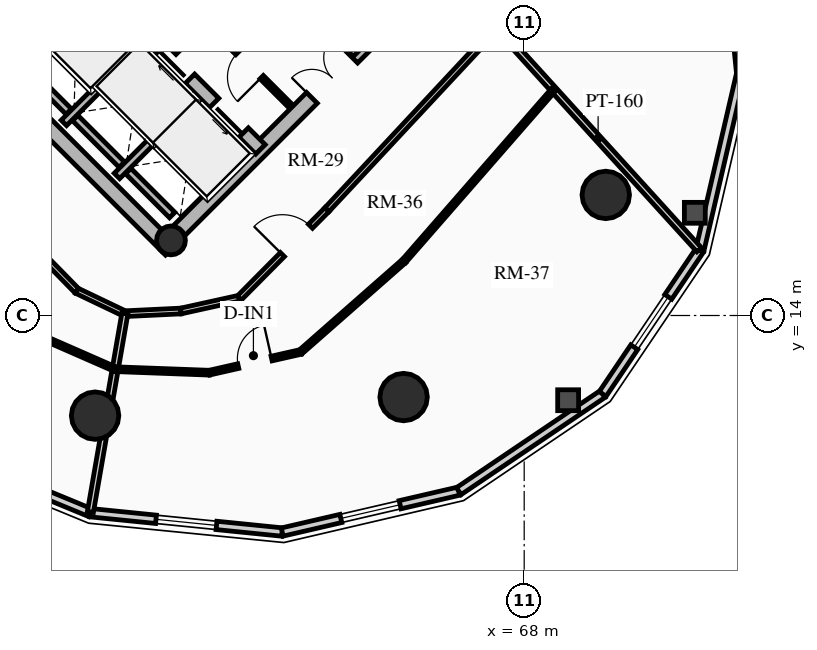
"""IFC4 building model, lengths in metres.
Left out: names, types, materials, properties, quantities, classifications, styles, units other than length and angle.
Written with IfcOpenShell. Run it as: python <this file> out.ifc"""

import sys

from ifc_helpers import new_model, si_unit, direction, frame, frame_2d, origin, origin_2d, place, context, subcontext, project, spatial, rectangle, circle, hollow_circle, extrude, source, transform, mapped, element, fill, save


model = new_model("IFC4")
c1 = context("Model", 3, precision=1e-05, world=origin(), true_north=direction((0.0, 1.0)))
c2 = subcontext(c1, "Body", "Model", "MODEL_VIEW")
j1 = project(units=[si_unit("LENGTHUNIT", "METRE"), si_unit("PLANEANGLEUNIT", "RADIAN")], contexts=[c1])
p1 = place(None, origin())
s1 = spatial("IfcSite", under=j1, at=p1, CompositionType="ELEMENT")
p2 = place(p1, origin())
s2 = spatial("IfcBuilding", under=s1, at=p2, CompositionType="ELEMENT")
p3 = place(p2, frame((0.0, 0.0, 166.15)))
s3 = spatial("IfcBuildingStorey", under=s2, at=p3, CompositionType="ELEMENT", Elevation=166.15)
p4 = place(p3, frame((58.702, 15.732, 0.0), z_axis=(0.0, 0.0, 1.0), x_axis=(-0.707106781187, 0.707106781187, 0.0)))
e1 = element("IfcWall", 1, at=p4, inside=s3, PredefinedType="SHEAR", context=c2, shape_type="SweptSolid", body=[
    extrude(rectangle(XDim=14.1, YDim=0.4, at=frame_2d((7.05, 0.0))), origin(), (0.0, 0.0, 1.0), 2.91),
])
p5 = place(p3, frame((58.561, 15.873, 0.0), z_axis=(0.0, 0.0, 1.0), x_axis=(0.707106781187, 0.707106781187, 0.0)))
e2 = element("IfcWall", 2, at=p5, inside=s3, PredefinedType="SHEAR", context=c2, shape_type="SweptSolid", body=[
    extrude(rectangle(XDim=10.7, YDim=0.4, at=frame_2d((5.35, 0.0))), origin(), (0.0, 0.0, 1.0), 2.91),
])
m1 = source(origin(), c2, "Body", "SweptSolid", [
    extrude(rectangle(XDim=1.5, YDim=2.02, at=frame_2d((0.75, 1.01))), frame((0.0, 0.21, 0.0), z_axis=(0.0, -1.0, 0.0), x_axis=(1.0, 0.0, 0.0)), (0.0, 0.0, 1.0), 0.42),
])
p6 = place(p5, frame((5.45, 0.0, 0.0)))
e3 = element("IfcOpeningElement", 3, at=p6, cuts=e2, PredefinedType="OPENING", context=c2, shape_type="MappedRepresentation", body=[
    mapped(m1, transform((0.0, 0.0, 0.0), x_axis=(1.0, 0.0, 0.0), y_axis=(0.0, 1.0, 0.0), z_axis=(0.0, 0.0, 1.0), scale=1.0)),
])
p7 = place(p3, frame((61.06, 18.373, 0.0), z_axis=(0.0, 0.0, 1.0), x_axis=(-0.707106781187, 0.707106781187, 0.0)))
e4 = element("IfcWall", 4, at=p7, inside=s3, PredefinedType="SHEAR", context=c2, shape_type="SweptSolid", body=[
    extrude(rectangle(XDim=13.7, YDim=0.35, at=frame_2d((6.85, 0.0))), origin(), (0.0, 0.0, 1.0), 2.91),
])
m2 = source(origin(), c2, "Body", "SweptSolid", [
    extrude(rectangle(XDim=1.1, YDim=2.015, at=frame_2d((0.55, 1.007))), frame((0.0, 0.185, 0.0), z_axis=(0.0, -1.0, 0.0), x_axis=(1.0, 0.0, 0.0)), (0.0, 0.0, 1.0), 0.37),
])
p8 = place(p7, frame((4.85, 0.0, 0.0)))
e5 = element("IfcOpeningElement", 5, at=p8, cuts=e4, PredefinedType="OPENING", context=c2, shape_type="MappedRepresentation", body=[
    mapped(m2, transform((0.0, 0.0, 0.0), x_axis=(1.0, 0.0, 0.0), y_axis=(0.0, 1.0, 0.0), z_axis=(0.0, 0.0, 1.0), scale=1.0)),
])
p9 = place(p7, frame((0.625, 0.0, 0.0)))
e6 = element("IfcOpeningElement", 6, at=p9, cuts=e4, PredefinedType="OPENING", context=c2, shape_type="MappedRepresentation", body=[
    mapped(m2, transform((0.0, 0.0, 0.0), x_axis=(1.0, 0.0, 0.0), y_axis=(0.0, 1.0, 0.0), z_axis=(0.0, 0.0, 1.0), scale=1.0)),
])
p10 = place(p7, frame((2.625, 0.0, 0.0)))
e7 = element("IfcOpeningElement", 7, at=p10, cuts=e4, PredefinedType="OPENING", context=c2, shape_type="MappedRepresentation", body=[
    mapped(m2, transform((0.0, 0.0, 0.0), x_axis=(1.0, 0.0, 0.0), y_axis=(0.0, 1.0, 0.0), z_axis=(0.0, 0.0, 1.0), scale=1.0)),
])
m3 = source(origin(), c2, "Body", "SweptSolid", [
    extrude(rectangle(XDim=1.15, YDim=2.02, at=frame_2d((0.575, 1.01))), frame((0.0, 0.185, 0.0), z_axis=(0.0, -1.0, 0.0), x_axis=(1.0, 0.0, 0.0)), (0.0, 0.0, 1.0), 0.37),
])
p11 = place(p7, frame((7.27, 0.0, 0.0)))
e8 = element("IfcOpeningElement", 8, at=p11, cuts=e4, PredefinedType="OPENING", context=c2, shape_type="MappedRepresentation", body=[
    mapped(m3, transform((0.0, 0.0, 0.0), x_axis=(1.0, 0.0, 0.0), y_axis=(0.0, 1.0, 0.0), z_axis=(0.0, 0.0, 1.0), scale=1.0)),
])
p12 = place(p3, frame((63.627, 20.94, 0.0), z_axis=(0.0, 0.0, 1.0), x_axis=(-0.707119496762, 0.707094065383, 0.0)))
e9 = element("IfcWall", 9, at=p12, inside=s3, PredefinedType="SHEAR", context=c2, shape_type="SweptSolid", body=[
    extrude(rectangle(XDim=9.6, YDim=0.35, at=frame_2d((4.8, 0.0))), origin(), (0.0, 0.0, 1.0), 2.91),
])
p13 = place(p12, frame((5.28, 0.0, 0.0)))
e10 = element("IfcOpeningElement", 10, at=p13, cuts=e9, PredefinedType="OPENING", context=c2, shape_type="MappedRepresentation", body=[
    mapped(m3, transform((0.0, 0.0, 0.0), x_axis=(1.0, 0.0, 0.0), y_axis=(0.0, 1.0, 0.0), z_axis=(0.0, 0.0, 1.0), scale=1.0)),
])
p14 = place(p3, frame((53.784, 21.003, 0.0), z_axis=(0.0, 0.0, 1.0), x_axis=(0.707106781187, 0.707106781187, 0.0)))
e11 = element("IfcWall", 11, at=p14, inside=s3, PredefinedType="SHEAR", context=c2, shape_type="SweptSolid", body=[
    extrude(rectangle(XDim=3.285, YDim=0.35, at=frame_2d((1.643, 0.0))), origin(), (0.0, 0.0, 1.0), 2.91),
])
p15 = place(p3, frame((58.706, 15.976, 0.0), z_axis=(0.0, 0.0, 1.0), x_axis=(0.707106781187, 0.707106781187, 0.0)))
e12 = element("IfcColumn", 12, at=p15, inside=s3, PredefinedType="COLUMN", context=c2, shape_type="SweptSolid", body=[
    extrude(hollow_circle(Radius=0.38, WallThickness=0.032, at=origin_2d()), origin(), (0.0, 0.0, 1.0), 2.91),
])
for number, where, z_axis, x_axis in (
    (13, (56.709, 11.365, 0.0), (0.0, 0.0, 1.0), (1.0, 0.0, 0.0)),
    (14, (64.827, 11.854, 0.0), (0.0, 0.0, 1.0), (1.0, 0.0, 0.0)),
    (15, (70.146, 17.173, 0.0), (0.0, 0.0, 1.0), (1.0, 0.0, 0.0)),
):
    element("IfcColumn", number, at=place(p3, frame(where, z_axis=z_axis, x_axis=x_axis)), inside=s3, PredefinedType="USERDEFINED", context=c2, shape_type="SweptSolid", body=[
        extrude(circle(Radius=0.625, at=origin_2d()), origin(), (0.0, 0.0, 1.0), 2.91),
    ])
p16 = place(p3, frame((56.582, 8.811, 0.0), z_axis=(0.0, 0.0, 1.0), x_axis=(-0.924528197738, 0.38111364655, 0.0)))
e16 = element("IfcWall", 16, at=p16, inside=s3, PredefinedType="SOLIDWALL", context=c2, shape_type="SweptSolid", body=[
    extrude(rectangle(XDim=5.366, YDim=0.22, at=frame_2d((2.683, 0.0))), origin(), (0.0, 0.0, 1.0), 2.675),
])
p17 = place(p3, frame((61.633, 8.302, 0.0), z_axis=(0.0, 0.0, 1.0), x_axis=(-0.994959267396, 0.100279889424, 0.0)))
e17 = element("IfcWall", 17, at=p17, inside=s3, PredefinedType="SOLIDWALL", context=c2, shape_type="SweptSolid", body=[
    extrude(rectangle(XDim=5.076, YDim=0.22, at=frame_2d((2.538, 0.0))), origin(), (0.0, 0.0, 1.0), 2.675),
])
m4 = source(origin(), c2, "Body", "SweptSolid", [
    extrude(rectangle(XDim=1.6, YDim=1.3, at=frame_2d((0.8, 0.65))), frame((0.0, 0.12, 0.0), z_axis=(0.0, -1.0, 0.0), x_axis=(1.0, 0.0, 0.0)), (0.0, 0.0, 1.0), 0.24),
])
p18 = place(p17, frame((1.738, 0.0, 0.65)))
e18 = element("IfcOpeningElement", 18, at=p18, cuts=e17, PredefinedType="OPENING", context=c2, shape_type="MappedRepresentation", body=[
    mapped(m4, transform((0.0, 0.0, 0.0), x_axis=(1.0, 0.0, 0.0), y_axis=(0.0, 1.0, 0.0), z_axis=(0.0, 0.0, 1.0), scale=1.0)),
])
p19 = place(p3, frame((66.279, 9.378, 0.0), z_axis=(0.0, 0.0, 1.0), x_axis=(-0.974206226622, -0.225659540039, 0.0)))
e19 = element("IfcWall", 19, at=p19, inside=s3, PredefinedType="SOLIDWALL", context=c2, shape_type="SweptSolid", body=[
    extrude(rectangle(XDim=4.769, YDim=0.22, at=frame_2d((2.385, 0.0))), origin(), (0.0, 0.0, 1.0), 2.675),
])
p20 = place(p19, frame((1.585, 0.0, 0.65)))
e20 = element("IfcOpeningElement", 20, at=p20, cuts=e19, PredefinedType="OPENING", context=c2, shape_type="MappedRepresentation", body=[
    mapped(m4, transform((0.0, 0.0, 0.0), x_axis=(1.0, 0.0, 0.0), y_axis=(0.0, 1.0, 0.0), z_axis=(0.0, 0.0, 1.0), scale=1.0)),
])
p21 = place(p3, frame((70.065, 11.935, 0.0), z_axis=(0.0, 0.0, 1.0), x_axis=(-0.828739009952, -0.559635286042, 0.0)))
e21 = element("IfcWall", 21, at=p21, inside=s3, PredefinedType="SOLIDWALL", context=c2, shape_type="SweptSolid", body=[
    extrude(rectangle(XDim=4.569, YDim=0.22, at=frame_2d((2.284, 0.0))), origin(), (0.0, 0.0, 1.0), 2.675),
])
p22 = place(p3, frame((72.622, 15.721, 0.0), z_axis=(0.0, 0.0, 1.0), x_axis=(-0.559635286042, -0.828739009952, 0.0)))
e22 = element("IfcWall", 22, at=p22, inside=s3, PredefinedType="SOLIDWALL", context=c2, shape_type="SweptSolid", body=[
    extrude(rectangle(XDim=4.569, YDim=0.22, at=frame_2d((2.284, 0.0))), origin(), (0.0, 0.0, 1.0), 2.675),
])
p23 = place(p22, frame((1.484, 0.0, 0.65)))
e23 = element("IfcOpeningElement", 23, at=p23, cuts=e22, PredefinedType="OPENING", context=c2, shape_type="MappedRepresentation", body=[
    mapped(m4, transform((0.0, 0.0, 0.0), x_axis=(1.0, 0.0, 0.0), y_axis=(0.0, 1.0, 0.0), z_axis=(0.0, 0.0, 1.0), scale=1.0)),
])
p24 = place(p3, frame((73.698, 20.367, 0.0), z_axis=(0.0, 0.0, 1.0), x_axis=(-0.225659540039, -0.974206226622, 0.0)))
e24 = element("IfcWall", 24, at=p24, inside=s3, PredefinedType="SOLIDWALL", context=c2, shape_type="SweptSolid", body=[
    extrude(rectangle(XDim=4.769, YDim=0.22, at=frame_2d((2.385, 0.0))), origin(), (0.0, 0.0, 1.0), 2.675),
])
p25 = place(p3, frame((73.189, 25.418, 0.0), z_axis=(0.0, 0.0, 1.0), x_axis=(0.100279889424, -0.994959267396, 0.0)))
e25 = element("IfcWall", 25, at=p25, inside=s3, PredefinedType="SOLIDWALL", context=c2, shape_type="SweptSolid", body=[
    extrude(rectangle(XDim=5.076, YDim=0.22, at=frame_2d((2.538, 0.0))), origin(), (0.0, 0.0, 1.0), 2.675),
])
p26 = place(p25, frame((1.738, 0.0, 0.65)))
e26 = element("IfcOpeningElement", 26, at=p26, cuts=e25, PredefinedType="OPENING", context=c2, shape_type="MappedRepresentation", body=[
    mapped(m4, transform((0.0, 0.0, 0.0), x_axis=(1.0, 0.0, 0.0), y_axis=(0.0, 1.0, 0.0), z_axis=(0.0, 0.0, 1.0), scale=1.0)),
])
p27 = place(p3, frame((55.888, 19.069, 0.0), z_axis=(0.0, 0.0, 1.0), x_axis=(0.707106781187, 0.707106781187, 0.0)))
e27 = element("IfcWall", 27, at=p27, inside=s3, PredefinedType="SHEAR", context=c2, shape_type="SweptSolid", body=[
    extrude(rectangle(XDim=2.97, YDim=0.2, at=frame_2d((1.485, 0.0))), origin(), (0.0, 0.0, 1.0), 2.91),
])
p28 = place(p3, frame((56.015, 19.366, 0.0), z_axis=(0.0, 0.0, 1.0), x_axis=(-0.707106781187, 0.707106781187, 0.0)))
e28 = element("IfcWall", 28, at=p28, inside=s3, PredefinedType="SHEAR", context=c2, shape_type="SweptSolid", body=[
    extrude(rectangle(XDim=2.44, YDim=0.2, at=frame_2d((1.22, 0.0))), origin(), (0.0, 0.0, 1.0), 2.91),
])
p29 = place(p3, frame((57.284, 17.673, 0.0), z_axis=(0.0, 0.0, 1.0), x_axis=(0.707147878904, 0.70706568108, 0.0)))
e29 = element("IfcWall", 29, at=p29, inside=s3, PredefinedType="SHEAR", context=c2, shape_type="SweptSolid", body=[
    extrude(rectangle(XDim=2.97, YDim=0.2, at=frame_2d((1.485, 0.0))), origin(), (0.0, 0.0, 1.0), 2.91),
])
p30 = place(p3, frame((57.412, 17.97, 0.0), z_axis=(0.0, 0.0, 1.0), x_axis=(-0.707106781187, 0.707106781187, 0.0)))
e30 = element("IfcWall", 30, at=p30, inside=s3, PredefinedType="SHEAR", context=c2, shape_type="SweptSolid", body=[
    extrude(rectangle(XDim=1.735, YDim=0.2, at=frame_2d((0.867, 0.0))), origin(), (0.0, 0.0, 1.0), 2.91),
])
p31 = place(p3, frame((58.737, 16.644, 0.0), z_axis=(0.0, 0.0, 1.0), x_axis=(-0.707032117043, 0.707181437447, 0.0)))
e31 = element("IfcWall", 31, at=p31, inside=s3, PredefinedType="SHEAR", context=c2, shape_type="SweptSolid", body=[
    extrude(rectangle(XDim=1.635, YDim=0.2, at=frame_2d((0.817, 0.0))), origin(), (0.0, 0.0, 1.0), 2.91),
])
p32 = place(p3, frame((61.835, 19.529, 0.0), z_axis=(0.0, 0.0, 1.0), x_axis=(-0.707146413884, 0.707067146267, 0.0)))
e32 = element("IfcWall", 32, at=p32, inside=s3, PredefinedType="PARTITIONING", context=c2, shape_type="SweptSolid", body=[
    extrude(rectangle(XDim=3.08, YDim=0.125, at=frame_2d((1.54, 0.0))), origin(), (0.0, 0.0, 1.0), 2.675),
])
m5 = source(origin(), c2, "Body", "SweptSolid", [
    extrude(rectangle(XDim=0.9, YDim=2.005, at=frame_2d((0.45, 1.002))), frame((0.0, 0.073, 0.0), z_axis=(0.0, -1.0, 0.0), x_axis=(1.0, 0.0, 0.0)), (0.0, 0.0, 1.0), 0.145),
])
p33 = place(p32, frame((1.05, 0.0, 0.0)))
e33 = element("IfcOpeningElement", 33, at=p33, cuts=e32, PredefinedType="OPENING", context=c2, shape_type="MappedRepresentation", body=[
    mapped(m5, transform((0.0, 0.0, 0.0), x_axis=(1.0, 0.0, 0.0), y_axis=(0.0, 1.0, 0.0), z_axis=(0.0, 0.0, 1.0), scale=1.0)),
])
p34 = place(p3, frame((58.794, 20.915, 0.0), z_axis=(0.0, 0.0, 1.0), x_axis=(0.707106781187, 0.707106781187, 0.0)))
e34 = element("IfcWall", 34, at=p34, inside=s3, PredefinedType="PARTITIONING", context=c2, shape_type="SweptSolid", body=[
    extrude(rectangle(XDim=1.1, YDim=0.125, at=frame_2d((0.55, 0.0))), origin(), (0.0, 0.0, 1.0), 2.675),
])
p35 = place(p3, frame((51.985, 18.985, 0.0), z_axis=(0.0, 0.0, 1.0), x_axis=(0.699619654291, -0.714515457726, 0.0)))
e35 = element("IfcWall", 35, at=p35, inside=s3, PredefinedType="PARTITIONING", context=c2, shape_type="SweptSolid", body=[
    extrude(rectangle(XDim=6.064, YDim=0.15, at=frame_2d((3.032, 0.0))), origin(), (0.0, 0.0, 1.0), 2.245),
])
m6 = source(origin(), c2, "Body", "SweptSolid", [
    extrude(rectangle(XDim=1.05, YDim=2.015, at=frame_2d((0.525, 1.007))), frame((0.0, 0.085, 0.0), z_axis=(0.0, -1.0, 0.0), x_axis=(1.0, 0.0, 0.0)), (0.0, 0.0, 1.0), 0.17),
])
p36 = place(p35, frame((2.507, 0.0, 0.0)))
e36 = element("IfcOpeningElement", 36, at=p36, cuts=e35, PredefinedType="OPENING", context=c2, shape_type="MappedRepresentation", body=[
    mapped(m6, transform((0.0, 0.0, 0.0), x_axis=(1.0, 0.0, 0.0), y_axis=(0.0, 1.0, 0.0), z_axis=(0.0, 0.0, 1.0), scale=1.0)),
])
p37 = place(p3, frame((56.227, 14.652, 0.0), z_axis=(0.0, 0.0, 1.0), x_axis=(0.902364039563, -0.430974639745, 0.0)))
e37 = element("IfcWall", 37, at=p37, inside=s3, PredefinedType="PARTITIONING", context=c2, shape_type="SweptSolid", body=[
    extrude(rectangle(XDim=1.401, YDim=0.15, at=frame_2d((0.701, 0.0))), origin(), (0.0, 0.0, 1.0), 2.245),
])
p38 = place(p3, frame((57.492, 14.048, 0.0), z_axis=(0.0, 0.0, 1.0), x_axis=(0.99885011351, 0.047942160364, 0.0)))
e38 = element("IfcWall", 38, at=p38, inside=s3, PredefinedType="PARTITIONING", context=c2, shape_type="SweptSolid", body=[
    extrude(rectangle(XDim=1.477, YDim=0.15, at=frame_2d((0.738, 0.0))), origin(), (0.0, 0.0, 1.0), 2.245),
])
p39 = place(p3, frame((58.967, 14.118, 0.0), z_axis=(0.0, 0.0, 1.0), x_axis=(0.976471358036, 0.215647135235, 0.0)))
e39 = element("IfcWall", 39, at=p39, inside=s3, PredefinedType="PARTITIONING", context=c2, shape_type="SweptSolid", body=[
    extrude(rectangle(XDim=1.571, YDim=0.15, at=frame_2d((0.786, 0.0))), origin(), (0.0, 0.0, 1.0), 2.245),
])
p40 = place(p3, frame((60.501, 14.457, 0.0), z_axis=(0.0, 0.0, 1.0), x_axis=(0.704012266258, 0.710187812454, 0.0)))
e40 = element("IfcWall", 40, at=p40, inside=s3, PredefinedType="PARTITIONING", context=c2, shape_type="SweptSolid", body=[
    extrude(rectangle(XDim=3.281, YDim=0.15, at=frame_2d((1.641, 0.0))), origin(), (0.0, 0.0, 1.0), 2.245),
])
p41 = place(p40, frame((1.614, 0.0, 0.0)))
e41 = element("IfcOpeningElement", 41, at=p41, cuts=e40, PredefinedType="OPENING", context=c2, shape_type="MappedRepresentation", body=[
    mapped(m6, transform((0.0, 0.0, 0.0), x_axis=(1.0, 0.0, 0.0), y_axis=(0.0, 1.0, 0.0), z_axis=(0.0, 0.0, 1.0), scale=1.0)),
])
p42 = place(p3, frame((62.812, 16.788, 0.0), z_axis=(0.0, 0.0, 1.0), x_axis=(0.682323555485, 0.731050316757, 0.0)))
e42 = element("IfcWall", 42, at=p42, inside=s3, PredefinedType="PARTITIONING", context=c2, shape_type="SweptSolid", body=[
    extrude(rectangle(XDim=6.559, YDim=0.15, at=frame_2d((3.279, 0.0))), origin(), (0.0, 0.0, 1.0), 2.245),
])
p43 = place(p3, frame((57.492, 14.048, 0.0), z_axis=(0.0, 0.0, 1.0), x_axis=(-0.171191349619, -0.985237799628, 0.0)))
e43 = element("IfcWall", 43, at=p43, inside=s3, PredefinedType="PARTITIONING", context=c2, shape_type="SweptSolid", body=[
    extrude(rectangle(XDim=5.295, YDim=0.16, at=frame_2d((2.647, 0.0))), origin(), (0.0, 0.0, 1.0), 2.245),
])
p44 = place(p3, frame((67.287, 21.582, 0.0), z_axis=(0.0, 0.0, 1.0), x_axis=(0.672520632772, -0.740078373212, 0.0)))
e44 = element("IfcWall", 44, at=p44, inside=s3, PredefinedType="PARTITIONING", context=c2, shape_type="SweptSolid", body=[
    extrude(rectangle(XDim=7.907, YDim=0.16, at=frame_2d((3.954, 0.0))), origin(), (0.0, 0.0, 1.0), 2.245),
])
p45 = place(p3, frame((54.94, 13.594, 0.0), z_axis=(0.0, 0.0, 1.0), x_axis=(0.915898070967, -0.401410916143, 0.0)))
e45 = element("IfcWall", 45, at=p45, inside=s3, PredefinedType="PARTITIONING", context=c2, shape_type="SweptSolid", body=[
    extrude(rectangle(XDim=2.509, YDim=0.125, at=frame_2d((1.254, 0.0))), origin(), (0.0, 0.0, 1.0), 2.245),
])
p46 = place(p3, frame((57.238, 12.587, 0.0), z_axis=(0.0, 0.0, 1.0), x_axis=(0.999316318576, -0.036971548882, 0.0)))
e46 = element("IfcWall", 46, at=p46, inside=s3, PredefinedType="PARTITIONING", context=c2, shape_type="SweptSolid", body=[
    extrude(rectangle(XDim=2.476, YDim=0.125, at=frame_2d((1.238, 0.0))), origin(), (0.0, 0.0, 1.0), 2.245),
])
p47 = place(p3, frame((59.713, 12.495, 0.0), z_axis=(0.0, 0.0, 1.0), x_axis=(0.975260144608, 0.221060286662, 0.0)))
e47 = element("IfcWall", 47, at=p47, inside=s3, PredefinedType="PARTITIONING", context=c2, shape_type="SweptSolid", body=[
    extrude(rectangle(XDim=2.465, YDim=0.125, at=frame_2d((1.232, 0.0))), origin(), (0.0, 0.0, 1.0), 2.245),
])
p48 = place(p47, frame((0.782, 0.0, 0.0)))
e48 = element("IfcOpeningElement", 48, at=p48, cuts=e47, PredefinedType="OPENING", context=c2, shape_type="MappedRepresentation", body=[
    mapped(m5, transform((0.0, 0.0, 0.0), x_axis=(1.0, 0.0, 0.0), y_axis=(0.0, 1.0, 0.0), z_axis=(0.0, 0.0, 1.0), scale=1.0)),
])
p49 = place(p3, frame((62.117, 13.04, 0.0), z_axis=(0.0, 0.0, 1.0), x_axis=(0.751084924077, 0.660205601933, 0.0)))
e49 = element("IfcWall", 49, at=p49, inside=s3, PredefinedType="PARTITIONING", context=c2, shape_type="SweptSolid", body=[
    extrude(rectangle(XDim=3.624, YDim=0.125, at=frame_2d((1.812, 0.0))), origin(), (0.0, 0.0, 1.0), 2.245),
])
p50 = place(p3, frame((64.839, 15.433, 0.0), z_axis=(0.0, 0.0, 1.0), x_axis=(0.657505208165, 0.753449999161, 0.0)))
e50 = element("IfcWall", 50, at=p50, inside=s3, PredefinedType="PARTITIONING", context=c2, shape_type="SweptSolid", body=[
    extrude(rectangle(XDim=5.988, YDim=0.125, at=frame_2d((2.994, 0.0))), origin(), (0.0, 0.0, 1.0), 2.245),
])
m7 = source(origin(), c2, "Body", "SweptSolid", [
    extrude(rectangle(XDim=1.6, YDim=1.3, at=frame_2d((0.8, 0.65))), frame((0.0, 0.03, 0.0), z_axis=(0.0, -1.0, 0.0), x_axis=(1.0, 0.0, 0.0)), (0.0, 0.0, 1.0), 0.06),
])
p51 = place(p18, origin())
e51 = element("IfcWindow", 51, at=p51, inside=s3, PartitioningType="SINGLE_PANEL", PredefinedType="WINDOW", context=c2, shape_type="MappedRepresentation", body=[
    mapped(m7, transform((0.0, 0.0, 0.0), x_axis=(1.0, 0.0, 0.0), y_axis=(0.0, 1.0, 0.0), z_axis=(0.0, 0.0, 1.0), scale=1.0)),
])
fill(e18, e51)
p52 = place(p20, origin())
e52 = element("IfcWindow", 52, at=p52, inside=s3, PartitioningType="SINGLE_PANEL", PredefinedType="WINDOW", context=c2, shape_type="MappedRepresentation", body=[
    mapped(m7, transform((0.0, 0.0, 0.0), x_axis=(1.0, 0.0, 0.0), y_axis=(0.0, 1.0, 0.0), z_axis=(0.0, 0.0, 1.0), scale=1.0)),
])
fill(e20, e52)
p53 = place(p23, origin())
e53 = element("IfcWindow", 53, at=p53, inside=s3, PartitioningType="SINGLE_PANEL", PredefinedType="WINDOW", context=c2, shape_type="MappedRepresentation", body=[
    mapped(m7, transform((0.0, 0.0, 0.0), x_axis=(1.0, 0.0, 0.0), y_axis=(0.0, 1.0, 0.0), z_axis=(0.0, 0.0, 1.0), scale=1.0)),
])
fill(e23, e53)
m8 = source(origin(), c2, "Body", "SweptSolid", [
    extrude(rectangle(XDim=1.1, YDim=2.015, at=frame_2d((0.55, 1.007))), frame((0.0, 0.025, 0.0), z_axis=(0.0, -1.0, 0.0), x_axis=(1.0, 0.0, 0.0)), (0.0, 0.0, 1.0), 0.05),
])
p54 = place(p9, origin())
e54 = element("IfcDoor", 54, at=p54, inside=s3, OperationType="SLIDING_TO_LEFT", PredefinedType="DOOR", context=c2, shape_type="MappedRepresentation", body=[
    mapped(m8, transform((0.0, 0.0, 0.0), x_axis=(1.0, 0.0, 0.0), y_axis=(0.0, 1.0, 0.0), z_axis=(0.0, 0.0, 1.0), scale=1.0)),
])
fill(e6, e54)
p55 = place(p10, origin())
e55 = element("IfcDoor", 55, at=p55, inside=s3, OperationType="SLIDING_TO_RIGHT", PredefinedType="DOOR", context=c2, shape_type="MappedRepresentation", body=[
    mapped(m8, transform((0.0, 0.0, 0.0), x_axis=(1.0, 0.0, 0.0), y_axis=(0.0, 1.0, 0.0), z_axis=(0.0, 0.0, 1.0), scale=1.0)),
])
fill(e7, e55)
m9 = source(origin(), c2, "Body", "SweptSolid", [
    extrude(rectangle(XDim=1.5, YDim=2.02, at=frame_2d((0.75, 1.01))), frame((0.0, 0.025, 0.0), z_axis=(0.0, -1.0, 0.0), x_axis=(1.0, 0.0, 0.0)), (0.0, 0.0, 1.0), 0.05),
])
p56 = place(p6, origin())
e56 = element("IfcDoor", 56, at=p56, inside=s3, OperationType="DOUBLE_DOOR_SINGLE_SWING", PredefinedType="DOOR", context=c2, shape_type="MappedRepresentation", body=[
    mapped(m9, transform((0.0, 0.0, 0.0), x_axis=(1.0, 0.0, 0.0), y_axis=(0.0, 1.0, 0.0), z_axis=(0.0, 0.0, 1.0), scale=1.0)),
])
fill(e3, e56)
m10 = source(origin(), c2, "Body", "SweptSolid", [
    extrude(rectangle(XDim=0.9, YDim=2.005, at=frame_2d((0.45, 1.002))), frame((0.0, 0.025, 0.0), z_axis=(0.0, -1.0, 0.0), x_axis=(1.0, 0.0, 0.0)), (0.0, 0.0, 1.0), 0.05),
])
p57 = place(p33, origin())
e57 = element("IfcDoor", 57, at=p57, inside=s3, OperationType="SINGLE_SWING_LEFT", PredefinedType="DOOR", context=c2, shape_type="MappedRepresentation", body=[
    mapped(m10, transform((0.0, 0.0, 0.0), x_axis=(1.0, 0.0, 0.0), y_axis=(0.0, 1.0, 0.0), z_axis=(0.0, 0.0, 1.0), scale=1.0)),
])
fill(e33, e57)
m11 = source(origin(), c2, "Body", "SweptSolid", [
    extrude(rectangle(XDim=1.05, YDim=2.015, at=frame_2d((0.525, 1.007))), frame((0.0, 0.025, 0.0), z_axis=(0.0, -1.0, 0.0), x_axis=(1.0, 0.0, 0.0)), (0.0, 0.0, 1.0), 0.05),
])
p58 = place(p41, origin())
e58 = element("IfcDoor", 58, at=p58, inside=s3, OperationType="SINGLE_SWING_LEFT", PredefinedType="DOOR", context=c2, shape_type="MappedRepresentation", body=[
    mapped(m11, transform((0.0, 0.0, 0.0), x_axis=(1.0, 0.0, 0.0), y_axis=(0.0, 1.0, 0.0), z_axis=(0.0, 0.0, 1.0), scale=1.0)),
])
fill(e41, e58)
p59 = place(p48, origin())
e59 = element("IfcDoor", 59, at=p59, inside=s3, OperationType="SINGLE_SWING_RIGHT", PredefinedType="DOOR", context=c2, shape_type="MappedRepresentation", body=[
    mapped(m10, transform((0.0, 0.0, 0.0), x_axis=(1.0, 0.0, 0.0), y_axis=(0.0, 1.0, 0.0), z_axis=(0.0, 0.0, 1.0), scale=1.0)),
])
fill(e48, e59)
save(model, sys.argv[1])
